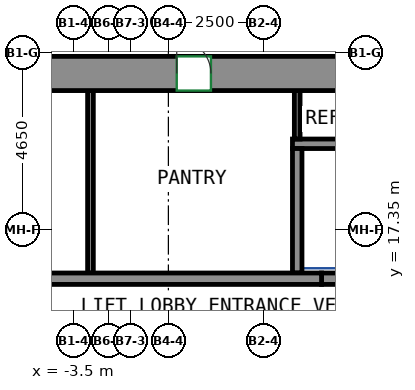
"""IFC4 building model, lengths in metres.
Left out: names, types, materials, properties, quantities, classifications, styles, units other than length and angle.
Written with IfcOpenShell. Run it as: python <this file> out.ifc"""

import sys

from ifc_helpers import new_model, si_unit, direction, frame, frame_2d, origin, place, context, subcontext, project, spatial, rectangle, extrude, source, transform, mapped, element, fill, save


model = new_model("IFC4")
c1 = context("Model", 3, precision=1e-05, world=origin(), true_north=direction((0.0, 1.0)))
c2 = subcontext(c1, "Body", "Model", "MODEL_VIEW")
j1 = project(units=[si_unit("LENGTHUNIT", "METRE"), si_unit("PLANEANGLEUNIT", "RADIAN")], contexts=[c1])
p1 = place(None, origin())
s1 = spatial("IfcSite", under=j1, at=p1, CompositionType="ELEMENT")
p2 = place(p1, origin())
s2 = spatial("IfcBuilding", under=s1, at=p2, CompositionType="ELEMENT")
p3 = place(p2, frame((0.0, 0.0, 168.5)))
s3 = spatial("IfcBuildingStorey", under=s2, at=p3, CompositionType="ELEMENT", Elevation=168.5)
m1 = source(origin(), c2, "Body", "SweptSolid", [
    extrude(rectangle(XDim=33.9, YDim=0.9, at=frame_2d((16.95, 0.0))), origin(), (0.0, 0.0, 1.0), 3.12),
])
p4 = place(p3, frame((-15.9, 21.45, 0.0), z_axis=(0.0, 0.0, 1.0), x_axis=(1.0, 0.0, 0.0)))
e1 = element("IfcWall", 1, at=p4, inside=s3, PredefinedType="SHEAR", context=c2, shape_type="MappedRepresentation", body=[
    mapped(m1, transform((0.0, 0.0, 0.0))),
])
p5 = place(p4, frame((8.42, 0.0, 0.0)))
e2 = element("IfcOpeningElement", 2, at=p5, cuts=e1, PredefinedType="OPENING", context=c2, shape_type="SweptSolid", body=[
    extrude(rectangle(XDim=0.9, YDim=2.1, at=frame_2d((0.45, 1.05))), frame((0.0, 0.46, 0.0), z_axis=(0.0, -1.0, 0.0), x_axis=(1.0, 0.0, 0.0)), (0.0, 0.0, 1.0), 0.92),
])
p6 = place(p4, frame((15.12, 0.0, 0.0)))
e3 = element("IfcOpeningElement", 3, at=p6, cuts=e1, PredefinedType="OPENING", context=c2, shape_type="SweptSolid", body=[
    extrude(rectangle(XDim=0.9, YDim=2.1, at=frame_2d((0.45, 1.05))), frame((0.0, 0.46, 0.0), z_axis=(0.0, -1.0, 0.0), x_axis=(1.0, 0.0, 0.0)), (0.0, 0.0, 1.0), 0.92),
])
p7 = place(p4, frame((19.944, 0.0, 0.0)))
e4 = element("IfcOpeningElement", 4, at=p7, cuts=e1, PredefinedType="OPENING", context=c2, shape_type="SweptSolid", body=[
    extrude(rectangle(XDim=0.9, YDim=2.1, at=frame_2d((0.45, 1.05))), frame((0.0, 0.46, 0.0), z_axis=(0.0, -1.0, 0.0), x_axis=(1.0, 0.0, 0.0)), (0.0, 0.0, 1.0), 0.92),
])
p8 = place(p4, frame((25.304, 0.0, 0.0)))
e5 = element("IfcOpeningElement", 5, at=p8, cuts=e1, PredefinedType="OPENING", context=c2, shape_type="SweptSolid", body=[
    extrude(rectangle(XDim=0.9, YDim=2.1, at=frame_2d((0.45, 1.05))), frame((0.0, 0.46, 0.0), z_axis=(0.0, -1.0, 0.0), x_axis=(1.0, 0.0, 0.0)), (0.0, 0.0, 1.0), 0.92),
])
p9 = place(p4, frame((2.425, 0.0, 0.0)))
e6 = element("IfcOpeningElement", 6, at=p9, cuts=e1, PredefinedType="OPENING", context=c2, shape_type="SweptSolid", body=[
    extrude(rectangle(XDim=0.9, YDim=2.1, at=frame_2d((0.45, 1.05))), frame((0.0, 0.46, 0.0), z_axis=(0.0, -1.0, 0.0), x_axis=(1.0, 0.0, 0.0)), (0.0, 0.0, 1.0), 0.92),
])
p10 = place(p4, frame((30.575, 0.0, 0.0)))
e7 = element("IfcOpeningElement", 7, at=p10, cuts=e1, PredefinedType="OPENING", context=c2, shape_type="SweptSolid", body=[
    extrude(rectangle(XDim=0.9, YDim=2.1, at=frame_2d((0.45, 1.05))), frame((0.0, 0.46, 0.0), z_axis=(0.0, -1.0, 0.0), x_axis=(1.0, 0.0, 0.0)), (0.0, 0.0, 1.0), 0.92),
])
m2 = source(origin(), c2, "Body", "SweptSolid", [
    extrude(rectangle(XDim=14.04, YDim=0.3, at=frame_2d((7.02, 0.0))), origin(), (0.0, 0.0, 1.0), 3.12),
])
p11 = place(p3, frame((-11.01, 16.05, 0.0), z_axis=(0.0, 0.0, 1.0), x_axis=(1.0, 0.0, 0.0)))
e8 = element("IfcWall", 8, at=p11, inside=s3, PredefinedType="SHEAR", context=c2, shape_type="MappedRepresentation", body=[
    mapped(m2, transform((0.0, 0.0, 0.0))),
])
m3 = source(origin(), c2, "Body", "SweptSolid", [
    extrude(rectangle(XDim=1.4, YDim=0.3, at=frame_2d((0.7, 0.0))), origin(), (0.0, 0.0, 1.0), 3.12),
])
p12 = place(p3, frame((3.03, 16.05, 0.0), z_axis=(0.0, 0.0, 1.0), x_axis=(1.0, 0.0, 0.0)))
e9 = element("IfcWall", 9, at=p12, inside=s3, PredefinedType="PARTITIONING", context=c2, shape_type="MappedRepresentation", body=[
    mapped(m3, transform((0.0, 0.0, 0.0))),
])
m4 = source(origin(), c2, "Body", "SweptSolid", [
    extrude(rectangle(XDim=10.97, YDim=0.25, at=frame_2d((5.485, 0.0))), origin(), (0.0, 0.0, 1.0), 3.12),
])
p13 = place(p3, frame((2.265, 19.6, 0.0), z_axis=(0.0, 0.0, 1.0), x_axis=(1.0, 0.0, 0.0)))
e10 = element("IfcWall", 10, at=p13, inside=s3, PredefinedType="PARTITIONING", context=c2, shape_type="MappedRepresentation", body=[
    mapped(m4, transform((0.0, 0.0, 0.0))),
])
m5 = source(origin(), c2, "Body", "SweptSolid", [
    extrude(rectangle(XDim=3.275, YDim=0.25, at=frame_2d((1.638, 0.0))), origin(), (0.0, 0.0, 1.0), 3.12),
])
p14 = place(p3, frame((2.39, 16.2, 0.0), z_axis=(0.0, 0.0, 1.0), x_axis=(0.0, 1.0, 0.0)))
e11 = element("IfcWall", 11, at=p14, inside=s3, PredefinedType="PARTITIONING", context=c2, shape_type="MappedRepresentation", body=[
    mapped(m5, transform((0.0, 0.0, 0.0))),
])
m6 = source(origin(), c2, "Body", "SweptSolid", [
    extrude(rectangle(XDim=4.8, YDim=0.15, at=frame_2d((2.4, 0.0))), origin(), (0.0, 0.0, 1.0), 3.12),
])
p15 = place(p3, frame((-3.05, 16.2, 0.0), z_axis=(0.0, 0.0, 1.0), x_axis=(0.0, 1.0, 0.0)))
e12 = element("IfcWall", 12, at=p15, inside=s3, PredefinedType="PARTITIONING", context=c2, shape_type="MappedRepresentation", body=[
    mapped(m6, transform((0.0, 0.0, 0.0))),
])
m7 = source(origin(), c2, "Body", "SweptSolid", [
    extrude(rectangle(XDim=1.275, YDim=0.15, at=frame_2d((0.637, 0.0))), origin(), (0.0, 0.0, 1.0), 3.12),
])
p16 = place(p3, frame((2.39, 19.725, 0.0), z_axis=(0.0, 0.0, 1.0), x_axis=(0.0, 1.0, 0.0)))
e13 = element("IfcWall", 13, at=p16, inside=s3, PredefinedType="PARTITIONING", context=c2, shape_type="MappedRepresentation", body=[
    mapped(m7, transform((0.0, 0.0, 0.0))),
])
p17 = place(p6, origin())
e14 = element("IfcDoor", 14, at=p17, inside=s3, OperationType="SINGLE_SWING_LEFT", PredefinedType="DOOR", context=c2, shape_type="SweptSolid", body=[
    extrude(rectangle(XDim=0.9, YDim=2.1, at=frame_2d((0.45, 1.05))), frame((0.0, -0.305, 0.0), z_axis=(0.0, -1.0, 0.0), x_axis=(1.0, 0.0, 0.0)), (0.0, 0.0, 1.0), 0.05),
])
fill(e3, e14)
save(model, sys.argv[1])
